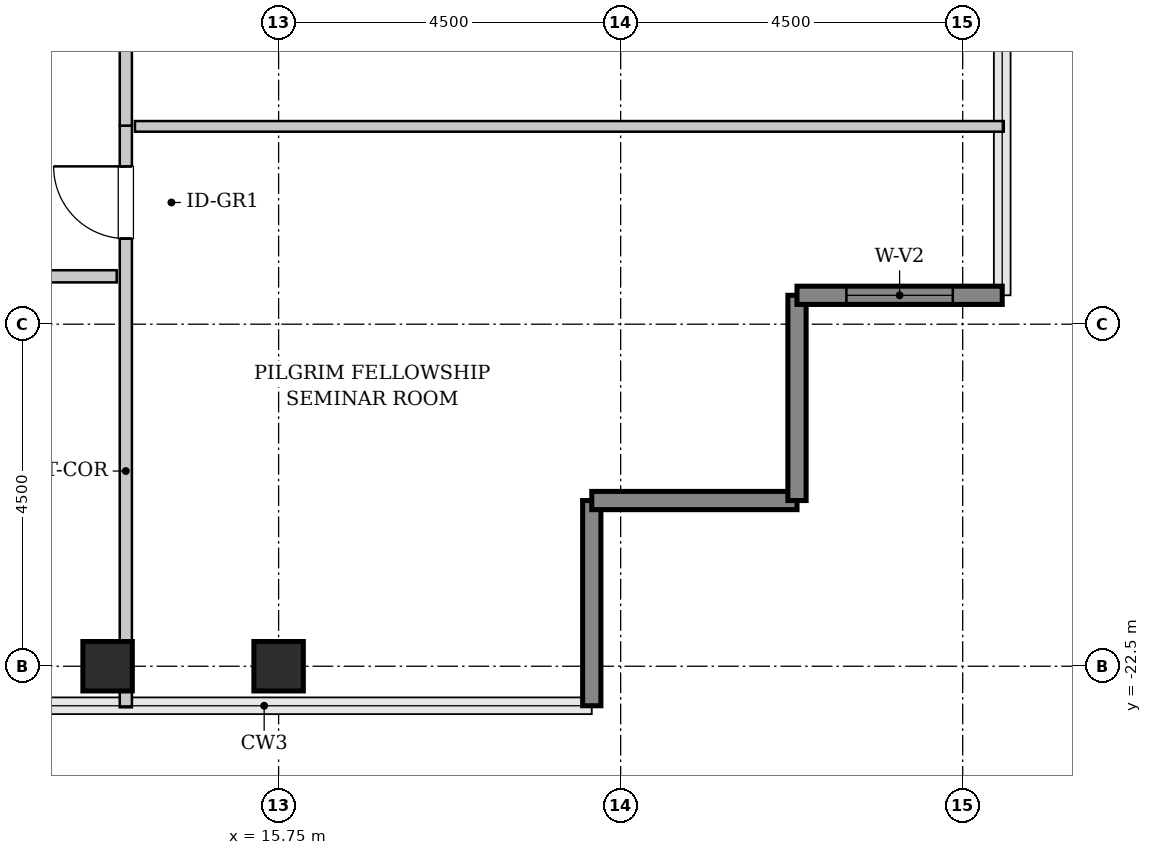
"""IFC4 building model, lengths in metres.
Left out: names, types, materials, properties, quantities, classifications, styles, units other than length and angle.
Written with IfcOpenShell. Run it as: python <this file> out.ifc"""

import sys

from ifc_helpers import new_model, si_unit, direction, frame, frame_2d, origin, origin_2d, place, context, subcontext, project, spatial, rectangle, hollow_rectangle, extrude, source, transform, mapped, element, fill, save


model = new_model("IFC4")
c1 = context("Model", 3, precision=1e-05, world=origin(), true_north=direction((0.0, 1.0)))
c2 = subcontext(c1, "Body", "Model", "MODEL_VIEW")
j1 = project(units=[si_unit("LENGTHUNIT", "METRE"), si_unit("PLANEANGLEUNIT", "RADIAN")], contexts=[c1])
p1 = place(None, origin())
s1 = spatial("IfcSite", under=j1, at=p1, CompositionType="ELEMENT")
p2 = place(p1, origin())
s2 = spatial("IfcBuilding", under=s1, at=p2, CompositionType="ELEMENT")
p3 = place(p2, frame((0.0, 0.0, 229.4)))
s3 = spatial("IfcBuildingStorey", under=s2, at=p3, CompositionType="ELEMENT", Elevation=229.4)
m1 = source(origin(), c2, "Body", "SweptSolid", [
    extrude(hollow_rectangle(XDim=0.65, YDim=0.65, WallThickness=0.032, InnerFilletRadius=0.032, OuterFilletRadius=0.064, at=origin_2d()), origin(), (0.0, 0.0, 1.0), 3.8),
])
for number, where, z_axis, x_axis in (
    (1, (13.5, -22.5, 0.0), (0.0, 0.0, 1.0), (1.0, 0.0, 0.0)),
    (2, (15.75, -22.5, 0.0), (0.0, 0.0, 1.0), (1.0, 0.0, 0.0)),
):
    element("IfcColumn", number, at=place(p3, frame(where, z_axis=z_axis, x_axis=x_axis)), inside=s3, PredefinedType="COLUMN", context=c2, shape_type="MappedRepresentation", body=[
        mapped(m1, transform((0.0, 0.0, 0.0), x_axis=(1.0, 0.0, 0.0), y_axis=(0.0, 1.0, 0.0), z_axis=(0.0, 0.0, 1.0), scale=1.0)),
    ])
m2 = source(origin(), c2, "Body", "SweptSolid", [
    extrude(rectangle(XDim=2.7, YDim=0.24, at=frame_2d((1.35, 0.0))), origin(), (0.0, 0.0, 1.0), 3.55),
])
for number, where, z_axis, x_axis in (
    (3, (19.87, -23.02, 0.0), (0.0, 0.0, 1.0), (0.0, 1.0, 0.0)),
    (4, (19.87, -20.32, 0.0), (0.0, 0.0, 1.0), (1.0, 0.0, 0.0)),
    (5, (22.57, -20.32, 0.0), (0.0, 0.0, 1.0), (0.0, 1.0, 0.0)),
):
    element("IfcWall", number, at=place(p3, frame(where, z_axis=z_axis, x_axis=x_axis)), inside=s3, PredefinedType="SHEAR", context=c2, shape_type="MappedRepresentation", body=[
        mapped(m2, transform((0.0, 0.0, 0.0), x_axis=(1.0, 0.0, 0.0), y_axis=(0.0, 1.0, 0.0), z_axis=(0.0, 0.0, 1.0), scale=1.0)),
    ])
p4 = place(p3, frame((22.57, -17.62, 0.0), z_axis=(0.0, 0.0, 1.0), x_axis=(1.0, 0.0, 0.0)))
e6 = element("IfcWall", 6, at=p4, inside=s3, PredefinedType="SHEAR", context=c2, shape_type="MappedRepresentation", body=[
    mapped(m2, transform((0.0, 0.0, 0.0), x_axis=(1.0, 0.0, 0.0), y_axis=(0.0, 1.0, 0.0), z_axis=(0.0, 0.0, 1.0), scale=1.0)),
])
p5 = place(p4, frame((0.65, 0.0, 0.85)))
e7 = element("IfcOpeningElement", 7, at=p5, cuts=e6, PredefinedType="OPENING", context=c2, shape_type="SweptSolid", body=[
    extrude(rectangle(XDim=1.4, YDim=1.8, at=frame_2d((0.7, 0.9))), frame((0.0, 0.13, 0.0), z_axis=(0.0, -1.0, 0.0), x_axis=(1.0, 0.0, 0.0)), (0.0, 0.0, 1.0), 0.26),
])
m3 = source(origin(), c2, "Body", "SweptSolid", [
    extrude(rectangle(XDim=7.653, YDim=0.16, at=frame_2d((3.826, 0.0))), origin(), (0.0, 0.0, 1.0), 3.535),
])
p6 = place(p3, frame((13.74, -23.04, 0.0), z_axis=(0.0, 0.0, 1.0), x_axis=(0.0, 1.0, 0.0)))
e8 = element("IfcWall", 8, at=p6, inside=s3, PredefinedType="PARTITIONING", context=c2, shape_type="MappedRepresentation", body=[
    mapped(m3, transform((0.0, 0.0, 0.0), x_axis=(1.0, 0.0, 0.0), y_axis=(0.0, 1.0, 0.0), z_axis=(0.0, 0.0, 1.0), scale=1.0)),
])
p7 = place(p6, frame((6.166, 0.0, 0.0)))
e9 = element("IfcOpeningElement", 9, at=p7, cuts=e8, PredefinedType="OPENING", context=c2, shape_type="SweptSolid", body=[
    extrude(rectangle(XDim=0.95, YDim=2.1, at=frame_2d((0.475, 1.05))), frame((0.0, 0.09, 0.0), z_axis=(0.0, -1.0, 0.0), x_axis=(1.0, 0.0, 0.0)), (0.0, 0.0, 1.0), 0.18),
])
m4 = source(origin(), c2, "Body", "SweptSolid", [
    extrude(rectangle(XDim=11.43, YDim=0.14, at=frame_2d((5.715, 0.0))), origin(), (0.0, 0.0, 1.0), 3.535),
])
p8 = place(p3, frame((13.86, -15.397, 0.0), z_axis=(0.0, 0.0, 1.0), x_axis=(1.0, 0.0, 0.0)))
e10 = element("IfcWall", 10, at=p8, inside=s3, PredefinedType="PARTITIONING", context=c2, shape_type="MappedRepresentation", body=[
    mapped(m4, transform((0.0, 0.0, 0.0), x_axis=(1.0, 0.0, 0.0), y_axis=(0.0, 1.0, 0.0), z_axis=(0.0, 0.0, 1.0), scale=1.0)),
])
m5 = source(origin(), c2, "Body", "SweptSolid", [
    extrude(rectangle(XDim=7.593, YDim=0.16, at=frame_2d((3.796, 0.0))), origin(), (0.0, 0.0, 1.0), 3.535),
])
p9 = place(p3, frame((13.74, -15.387, 0.0), z_axis=(0.0, 0.0, 1.0), x_axis=(0.0, 1.0, 0.0)))
e11 = element("IfcWall", 11, at=p9, inside=s3, PredefinedType="PARTITIONING", context=c2, shape_type="MappedRepresentation", body=[
    mapped(m5, transform((0.0, 0.0, 0.0), x_axis=(1.0, 0.0, 0.0), y_axis=(0.0, 1.0, 0.0), z_axis=(0.0, 0.0, 1.0), scale=1.0)),
])
p10 = place(p9, frame((3.321, 0.0, 0.0)))
e12 = element("IfcOpeningElement", 12, at=p10, cuts=e11, PredefinedType="OPENING", context=c2, shape_type="SweptSolid", body=[
    extrude(rectangle(XDim=0.95, YDim=2.1, at=frame_2d((0.475, 1.05))), frame((0.0, 0.09, 0.0), z_axis=(0.0, -1.0, 0.0), x_axis=(1.0, 0.0, 0.0)), (0.0, 0.0, 1.0), 0.18),
])
m6 = source(origin(), c2, "Body", "SweptSolid", [
    extrude(rectangle(XDim=5.225, YDim=0.16, at=frame_2d((2.613, 0.0))), origin(), (0.0, 0.0, 1.0), 3.535),
])
p11 = place(p3, frame((8.395, -17.37, 0.0), z_axis=(0.0, 0.0, 1.0), x_axis=(1.0, 0.0, 0.0)))
e13 = element("IfcWall", 13, at=p11, inside=s3, PredefinedType="PARTITIONING", context=c2, shape_type="MappedRepresentation", body=[
    mapped(m6, transform((0.0, 0.0, 0.0), x_axis=(1.0, 0.0, 0.0), y_axis=(0.0, 1.0, 0.0), z_axis=(0.0, 0.0, 1.0), scale=1.0)),
])
p12 = place(p11, frame((1.543, 0.0, 0.0)))
e14 = element("IfcOpeningElement", 14, at=p12, cuts=e13, PredefinedType="OPENING", context=c2, shape_type="SweptSolid", body=[
    extrude(rectangle(XDim=0.95, YDim=2.1, at=frame_2d((0.475, 1.05))), frame((0.0, 0.09, 0.0), z_axis=(0.0, -1.0, 0.0), x_axis=(1.0, 0.0, 0.0)), (0.0, 0.0, 1.0), 0.18),
])
m7 = source(origin(), c2, "Body", "SweptSolid", [
    extrude(rectangle(XDim=1.4, YDim=1.8, at=frame_2d((0.7, 0.9))), frame((0.0, 0.03, 0.0), z_axis=(0.0, -1.0, 0.0), x_axis=(1.0, 0.0, 0.0)), (0.0, 0.0, 1.0), 0.06),
])
p13 = place(p5, origin())
e15 = element("IfcWindow", 15, at=p13, inside=s3, PartitioningType="SINGLE_PANEL", PredefinedType="WINDOW", context=c2, shape_type="MappedRepresentation", body=[
    mapped(m7, transform((0.0, 0.0, 0.0), x_axis=(1.0, 0.0, 0.0), y_axis=(0.0, 1.0, 0.0), z_axis=(0.0, 0.0, 1.0), scale=1.0)),
])
fill(e7, e15)
m8 = source(origin(), c2, "Body", "SweptSolid", [
    extrude(rectangle(XDim=0.95, YDim=2.1, at=frame_2d((0.475, 1.05))), frame((0.0, 0.025, 0.0), z_axis=(0.0, -1.0, 0.0), x_axis=(1.0, 0.0, 0.0)), (0.0, 0.0, 1.0), 0.05),
])
p14 = place(p7, origin())
e16 = element("IfcDoor", 16, at=p14, inside=s3, OperationType="SINGLE_SWING_RIGHT", PredefinedType="DOOR", context=c2, shape_type="MappedRepresentation", body=[
    mapped(m8, transform((0.0, 0.0, 0.0), x_axis=(1.0, 0.0, 0.0), y_axis=(0.0, 1.0, 0.0), z_axis=(0.0, 0.0, 1.0), scale=1.0)),
])
fill(e9, e16)
save(model, sys.argv[1])
